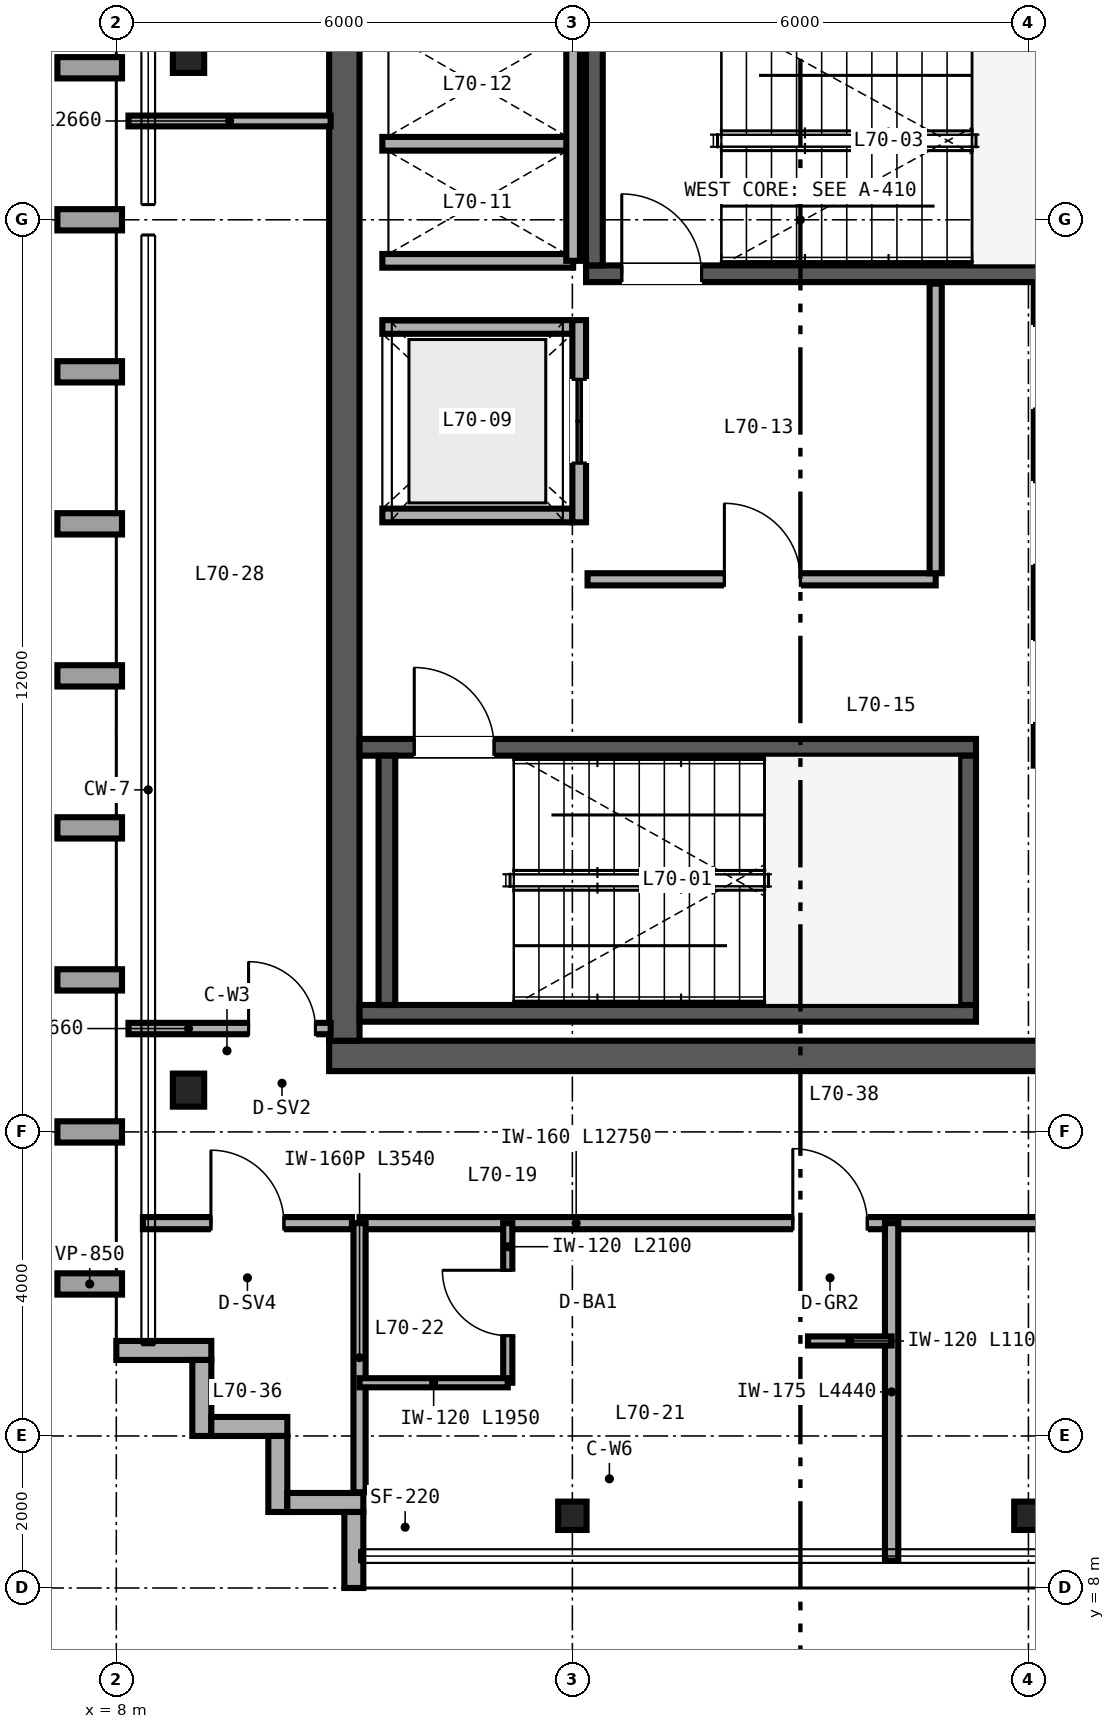
"""IFC4 building model, lengths in metres.
Left out: names, types, materials, properties, quantities, classifications, styles, units other than length and angle.
Written with IfcOpenShell. Run it as: python <this file> out.ifc"""

import sys

from ifc_helpers import new_model, si_unit, direction, frame, frame_2d, origin, origin_2d, place, context, subcontext, project, spatial, rectangle, i_section, extrude, source, transform, mapped, element, fill, save


model = new_model("IFC4")
c1 = context("Model", 3, precision=1e-05, world=origin(), true_north=direction((0.0, 1.0)))
c2 = subcontext(c1, "Body", "Model", "MODEL_VIEW")
j1 = project(units=[si_unit("LENGTHUNIT", "METRE"), si_unit("PLANEANGLEUNIT", "RADIAN")], contexts=[c1])
p1 = place(None, origin())
s1 = spatial("IfcSite", under=j1, at=p1, CompositionType="ELEMENT")
p2 = place(p1, origin())
s2 = spatial("IfcBuilding", under=s1, at=p2, CompositionType="ELEMENT")
p3 = place(p2, frame((0.0, 0.0, 276.0)))
s3 = spatial("IfcBuildingStorey", under=s2, at=p3, CompositionType="ELEMENT", Elevation=276.0)
p4 = place(p3, frame((10.8, 15.0, 0.0), z_axis=(0.0, 0.0, 1.0), x_axis=(1.0, 0.0, 0.0)))
e1 = element("IfcWall", 1, at=p4, inside=s3, PredefinedType="SHEAR", context=c2, shape_type="SweptSolid", body=[
    extrude(rectangle(XDim=12.4, YDim=0.4, at=frame_2d((6.2, 0.0))), origin(), (0.0, 0.0, 1.0), 3.38),
])
p5 = place(p4, frame((10.1, 0.0, 0.0)))
e2 = element("IfcOpeningElement", 2, at=p5, cuts=e1, PredefinedType="OPENING", context=c2, shape_type="SweptSolid", body=[
    extrude(rectangle(XDim=1.0, YDim=2.15, at=frame_2d((0.5, 1.075))), frame((0.0, 0.21, 0.0), z_axis=(0.0, -1.0, 0.0), x_axis=(1.0, 0.0, 0.0)), (0.0, 0.0, 1.0), 0.42),
])
p6 = place(p3, frame((11.0, 15.2, 0.0), z_axis=(0.0, 0.0, 1.0), x_axis=(0.0, 1.0, 0.0)))
e3 = element("IfcWall", 3, at=p6, inside=s3, PredefinedType="SHEAR", context=c2, shape_type="SweptSolid", body=[
    extrude(rectangle(XDim=21.6, YDim=0.4, at=frame_2d((10.8, 0.0))), origin(), (0.0, 0.0, 1.0), 3.38),
])
p7 = place(p3, frame((11.2, 15.56, 0.0), z_axis=(0.0, 0.0, 1.0), x_axis=(1.0, 0.0, 0.0)))
e4 = element("IfcWall", 4, at=p7, inside=s3, PredefinedType="SHEAR", context=c2, shape_type="SweptSolid", body=[
    extrude(rectangle(XDim=8.11, YDim=0.22, at=frame_2d((4.055, 0.0))), origin(), (0.0, 0.0, 1.0), 3.4),
])
p8 = place(p3, frame((11.2, 19.06, 0.0), z_axis=(0.0, 0.0, 1.0), x_axis=(1.0, 0.0, 0.0)))
e5 = element("IfcWall", 5, at=p8, inside=s3, PredefinedType="SHEAR", context=c2, shape_type="SweptSolid", body=[
    extrude(rectangle(XDim=8.11, YDim=0.22, at=frame_2d((4.055, 0.0))), origin(), (0.0, 0.0, 1.0), 3.4),
])
p9 = place(p8, frame((0.72, 0.0, 0.0)))
e6 = element("IfcOpeningElement", 6, at=p9, cuts=e5, PredefinedType="OPENING", context=c2, shape_type="SweptSolid", body=[
    extrude(rectangle(XDim=1.05, YDim=2.15, at=frame_2d((0.525, 1.075))), frame((0.0, 0.12, 0.0), z_axis=(0.0, -1.0, 0.0), x_axis=(1.0, 0.0, 0.0)), (0.0, 0.0, 1.0), 0.24),
])
for number, where, z_axis, x_axis in (
    (7, (11.56, 15.67, 0.0), (0.0, 0.0, 1.0), (0.0, 1.0, 0.0)),
    (8, (19.2, 15.67, 0.0), (0.0, 0.0, 1.0), (0.0, 1.0, 0.0)),
):
    element("IfcWall", number, at=place(p3, frame(where, z_axis=z_axis, x_axis=x_axis)), inside=s3, PredefinedType="SHEAR", context=c2, shape_type="SweptSolid", body=[
        extrude(rectangle(XDim=3.28, YDim=0.22, at=frame_2d((1.64, 0.0))), origin(), (0.0, 0.0, 1.0), 3.4),
    ])
p10 = place(p3, frame((14.18, 25.29, 0.0), z_axis=(0.0, 0.0, 1.0), x_axis=(1.0, 0.0, 0.0)))
e9 = element("IfcWall", 9, at=p10, inside=s3, PredefinedType="SHEAR", context=c2, shape_type="SweptSolid", body=[
    extrude(rectangle(XDim=8.62, YDim=0.22, at=frame_2d((4.31, 0.0))), origin(), (0.0, 0.0, 1.0), 3.4),
])
p11 = place(p10, frame((0.47, 0.0, 0.0)))
e10 = element("IfcOpeningElement", 10, at=p11, cuts=e9, PredefinedType="OPENING", context=c2, shape_type="SweptSolid", body=[
    extrude(rectangle(XDim=1.05, YDim=2.15, at=frame_2d((0.525, 1.075))), frame((0.0, 0.12, 0.0), z_axis=(0.0, -1.0, 0.0), x_axis=(1.0, 0.0, 0.0)), (0.0, 0.0, 1.0), 0.24),
])
p12 = place(p3, frame((14.29, 25.4, 0.0), z_axis=(0.0, 0.0, 1.0), x_axis=(0.0, 1.0, 0.0)))
e11 = element("IfcWall", 11, at=p12, inside=s3, PredefinedType="SHEAR", context=c2, shape_type="SweptSolid", body=[
    extrude(rectangle(XDim=3.28, YDim=0.22, at=frame_2d((1.64, 0.0))), origin(), (0.0, 0.0, 1.0), 3.4),
])
m1 = source(origin(), c2, "Body", "SweptSolid", [
    extrude(i_section(OverallWidth=0.412, OverallDepth=0.435, WebThickness=0.036, FlangeThickness=0.057, FilletRadius=0.025, at=origin_2d()), origin(), (0.0, 0.0, 1.0), 3.38),
])
for number, where, z_axis, x_axis in (
    (12, (8.95, 14.55, 0.0), (0.0, 0.0, 1.0), (1.0, 0.0, 0.0)),
    (13, (8.95, 28.15, 0.0), (0.0, 0.0, 1.0), (1.0, 0.0, 0.0)),
):
    element("IfcColumn", number, at=place(p3, frame(where, z_axis=z_axis, x_axis=x_axis)), inside=s3, PredefinedType="COLUMN", context=c2, shape_type="MappedRepresentation", body=[
        mapped(m1, transform((0.0, 0.0, 0.0), scale=1.0)),
    ])
m2 = source(origin(), c2, "Body", "SweptSolid", [
    extrude(i_section(OverallWidth=0.374, OverallDepth=0.373, WebThickness=0.016, FlangeThickness=0.026, FilletRadius=0.025, at=origin_2d()), origin(), (0.0, 0.0, 1.0), 3.38),
])
for number, where, z_axis, x_axis in (
    (14, (14.0, 8.95, 0.0), (0.0, 0.0, 1.0), (1.0, 0.0, 0.0)),
    (15, (20.0, 8.95, 0.0), (0.0, 0.0, 1.0), (1.0, 0.0, 0.0)),
):
    element("IfcColumn", number, at=place(p3, frame(where, z_axis=z_axis, x_axis=x_axis)), inside=s3, PredefinedType="COLUMN", context=c2, shape_type="MappedRepresentation", body=[
        mapped(m2, transform((0.0, 0.0, 0.0), scale=1.0)),
    ])
p13 = place(p3, frame((8.0, 11.125, 0.0), z_axis=(0.0, 0.0, 1.0), x_axis=(1.0, 0.0, 0.0)))
e16 = element("IfcWall", 16, at=p13, inside=s3, PredefinedType="SOLIDWALL", context=c2, shape_type="SweptSolid", body=[
    extrude(rectangle(XDim=1.25, YDim=0.25, at=frame_2d((0.625, 0.0))), origin(), (0.0, 0.0, 1.0), 3.38),
])
for number, where, z_axis, x_axis in (
    (17, (9.125, 11.0, 0.0), (0.0, 0.0, 1.0), (0.0, -1.0, 0.0)),
    (18, (9.25, 10.125, 0.0), (0.0, 0.0, 1.0), (1.0, 0.0, 0.0)),
    (19, (10.125, 10.0, 0.0), (0.0, 0.0, 1.0), (0.0, -1.0, 0.0)),
    (20, (10.25, 9.125, 0.0), (0.0, 0.0, 1.0), (1.0, 0.0, 0.0)),
    (21, (11.125, 9.0, 0.0), (0.0, 0.0, 1.0), (0.0, -1.0, 0.0)),
):
    element("IfcWall", number, at=place(p3, frame(where, z_axis=z_axis, x_axis=x_axis)), inside=s3, PredefinedType="SOLIDWALL", context=c2, shape_type="SweptSolid", body=[
        extrude(rectangle(XDim=1.0, YDim=0.25, at=frame_2d((0.5, 0.0))), origin(), (0.0, 0.0, 1.0), 3.38),
    ])
p14 = place(p3, frame((20.16, 18.82, 0.0), z_axis=(0.0, 0.0, 1.0), x_axis=(0.0, 1.0, 0.0)))
e22 = element("IfcWall", 22, at=p14, inside=s3, PredefinedType="SOLIDWALL", context=c2, shape_type="SweptSolid", body=[
    extrude(rectangle(XDim=6.32, YDim=0.18, at=frame_2d((3.16, 0.0))), origin(), (0.0, 0.0, 1.0), 2.48),
])
p15 = place(p14, frame((0.555, 0.0, 0.0)))
e23 = element("IfcOpeningElement", 23, at=p15, cuts=e22, PredefinedType="OPENING", context=c2, shape_type="SweptSolid", body=[
    extrude(rectangle(XDim=1.1, YDim=2.2, at=frame_2d((0.55, 1.1))), frame((0.0, 0.1, 0.0), z_axis=(0.0, -1.0, 0.0), x_axis=(1.0, 0.0, 0.0)), (0.0, 0.0, 1.0), 0.2),
])
p16 = place(p14, frame((2.635, 0.0, 0.0)))
e24 = element("IfcOpeningElement", 24, at=p16, cuts=e22, PredefinedType="OPENING", context=c2, shape_type="SweptSolid", body=[
    extrude(rectangle(XDim=1.1, YDim=2.2, at=frame_2d((0.55, 1.1))), frame((0.0, 0.1, 0.0), z_axis=(0.0, -1.0, 0.0), x_axis=(1.0, 0.0, 0.0)), (0.0, 0.0, 1.0), 0.2),
])
p17 = place(p14, frame((4.69, 0.0, 0.0)))
e25 = element("IfcOpeningElement", 25, at=p17, cuts=e22, PredefinedType="OPENING", context=c2, shape_type="SweptSolid", body=[
    extrude(rectangle(XDim=1.1, YDim=2.2, at=frame_2d((0.55, 1.1))), frame((0.0, 0.1, 0.0), z_axis=(0.0, -1.0, 0.0), x_axis=(1.0, 0.0, 0.0)), (0.0, 0.0, 1.0), 0.2),
])
for number, where, z_axis, x_axis in (
    (26, (11.5, 22.11, 0.0), (0.0, 0.0, 1.0), (1.0, 0.0, 0.0)),
    (27, (11.5, 24.59, 0.0), (0.0, 0.0, 1.0), (1.0, 0.0, 0.0)),
):
    element("IfcWall", number, at=place(p3, frame(where, z_axis=z_axis, x_axis=x_axis)), inside=s3, PredefinedType="SOLIDWALL", context=c2, shape_type="SweptSolid", body=[
        extrude(rectangle(XDim=2.5, YDim=0.18, at=frame_2d((1.25, 0.0))), origin(), (0.0, 0.0, 1.0), 3.38),
    ])
p18 = place(p3, frame((14.09, 22.02, 0.0), z_axis=(0.0, 0.0, 1.0), x_axis=(0.0, 1.0, 0.0)))
e28 = element("IfcWall", 28, at=p18, inside=s3, PredefinedType="SOLIDWALL", context=c2, shape_type="SweptSolid", body=[
    extrude(rectangle(XDim=2.66, YDim=0.18, at=frame_2d((1.33, 0.0))), origin(), (0.0, 0.0, 1.0), 3.38),
])
p19 = place(p18, frame((0.78, 0.0, 0.0)))
e29 = element("IfcOpeningElement", 29, at=p19, cuts=e28, PredefinedType="OPENING", context=c2, shape_type="SweptSolid", body=[
    extrude(rectangle(XDim=1.1, YDim=2.2, at=frame_2d((0.55, 1.1))), frame((0.0, 0.1, 0.0), z_axis=(0.0, -1.0, 0.0), x_axis=(1.0, 0.0, 0.0)), (0.0, 0.0, 1.0), 0.2),
])
for number, where, z_axis, x_axis in (
    (30, (11.5, 25.46, 0.0), (0.0, 0.0, 1.0), (1.0, 0.0, 0.0)),
    (31, (11.5, 27.0, 0.0), (0.0, 0.0, 1.0), (1.0, 0.0, 0.0)),
):
    element("IfcWall", number, at=place(p3, frame(where, z_axis=z_axis, x_axis=x_axis)), inside=s3, PredefinedType="SOLIDWALL", context=c2, shape_type="SweptSolid", body=[
        extrude(rectangle(XDim=2.51, YDim=0.18, at=frame_2d((1.255, 0.0))), origin(), (0.0, 0.0, 1.0), 3.38),
    ])
p20 = place(p3, frame((14.01, 25.46, 0.0), z_axis=(0.0, 0.0, 1.0), x_axis=(0.0, 1.0, 0.0)))
e32 = element("IfcWall", 32, at=p20, inside=s3, PredefinedType="SOLIDWALL", context=c2, shape_type="SweptSolid", body=[
    extrude(rectangle(XDim=3.08, YDim=0.18, at=frame_2d((1.54, 0.0))), origin(), (0.0, 0.0, 1.0), 3.38),
])
p21 = place(p3, frame((14.2, 21.27, 0.0), z_axis=(0.0, 0.0, 1.0), x_axis=(1.0, 0.0, 0.0)))
e33 = element("IfcWall", 33, at=p21, inside=s3, PredefinedType="PARTITIONING", context=c2, shape_type="SweptSolid", body=[
    extrude(rectangle(XDim=4.58, YDim=0.16, at=frame_2d((2.29, 0.0))), origin(), (0.0, 0.0, 1.0), 3.38),
])
p22 = place(p21, frame((1.8, 0.0, 0.0)))
e34 = element("IfcOpeningElement", 34, at=p22, cuts=e33, PredefinedType="OPENING", context=c2, shape_type="SweptSolid", body=[
    extrude(rectangle(XDim=1.0, YDim=2.15, at=frame_2d((0.5, 1.075))), frame((0.0, 0.09, 0.0), z_axis=(0.0, -1.0, 0.0), x_axis=(1.0, 0.0, 0.0)), (0.0, 0.0, 1.0), 0.18),
])
p23 = place(p3, frame((18.78, 21.35, 0.0), z_axis=(0.0, 0.0, 1.0), x_axis=(0.0, 1.0, 0.0)))
e35 = element("IfcWall", 35, at=p23, inside=s3, PredefinedType="PARTITIONING", context=c2, shape_type="SweptSolid", body=[
    extrude(rectangle(XDim=3.81, YDim=0.16, at=frame_2d((1.905, 0.0))), origin(), (0.0, 0.0, 1.0), 3.38),
])
p24 = place(p3, frame((11.2, 12.8, 0.0), z_axis=(0.0, 0.0, 1.0), x_axis=(1.0, 0.0, 0.0)))
e36 = element("IfcWall", 36, at=p24, inside=s3, PredefinedType="PARTITIONING", context=c2, shape_type="SweptSolid", body=[
    extrude(rectangle(XDim=12.75, YDim=0.16, at=frame_2d((6.375, 0.0))), origin(), (0.0, 0.0, 1.0), 3.38),
])
p25 = place(p24, frame((5.7, 0.0, 0.0)))
e37 = element("IfcOpeningElement", 37, at=p25, cuts=e36, PredefinedType="OPENING", context=c2, shape_type="SweptSolid", body=[
    extrude(rectangle(XDim=0.98, YDim=2.2, at=frame_2d((0.49, 1.1))), frame((0.0, 0.09, 0.0), z_axis=(0.0, -1.0, 0.0), x_axis=(1.0, 0.0, 0.0)), (0.0, 0.0, 1.0), 0.18),
])
p26 = place(p24, frame((9.395, 0.0, 0.0)))
e38 = element("IfcOpeningElement", 38, at=p26, cuts=e36, PredefinedType="OPENING", context=c2, shape_type="SweptSolid", body=[
    extrude(rectangle(XDim=0.96, YDim=2.15, at=frame_2d((0.48, 1.075))), frame((0.0, 0.09, 0.0), z_axis=(0.0, -1.0, 0.0), x_axis=(1.0, 0.0, 0.0)), (0.0, 0.0, 1.0), 0.18),
])
p27 = place(p3, frame((11.2, 9.26, 0.0), z_axis=(0.0, 0.0, 1.0), x_axis=(0.0, 1.0, 0.0)))
e39 = element("IfcWall", 39, at=p27, inside=s3, PredefinedType="PARTITIONING", context=c2, shape_type="SweptSolid", body=[
    extrude(rectangle(XDim=3.54, YDim=0.16, at=frame_2d((1.77, 0.0))), origin(), (0.0, 0.0, 1.0), 3.38),
])
p28 = place(p3, frame((18.2, 8.36, 0.0), z_axis=(0.0, 0.0, 1.0), x_axis=(0.0, 1.0, 0.0)))
e40 = element("IfcWall", 40, at=p28, inside=s3, PredefinedType="PARTITIONING", context=c2, shape_type="SweptSolid", body=[
    extrude(rectangle(XDim=4.44, YDim=0.175, at=frame_2d((2.22, 0.0))), origin(), (0.0, 0.0, 1.0), 2.687),
])
p29 = place(p3, frame((13.15, 10.7, 0.0), z_axis=(0.0, 0.0, 1.0), x_axis=(0.0, 1.0, 0.0)))
e41 = element("IfcWall", 41, at=p29, inside=s3, PredefinedType="PARTITIONING", context=c2, shape_type="SweptSolid", body=[
    extrude(rectangle(XDim=2.1, YDim=0.12, at=frame_2d((1.05, 0.0))), origin(), (0.0, 0.0, 1.0), 3.38),
])
p30 = place(p29, frame((0.62, 0.0, 0.0)))
e42 = element("IfcOpeningElement", 42, at=p30, cuts=e41, PredefinedType="OPENING", context=c2, shape_type="SweptSolid", body=[
    extrude(rectangle(XDim=0.86, YDim=2.1, at=frame_2d((0.43, 1.05))), frame((0.0, 0.07, 0.0), z_axis=(0.0, -1.0, 0.0), x_axis=(1.0, 0.0, 0.0)), (0.0, 0.0, 1.0), 0.14),
])
p31 = place(p3, frame((11.2, 10.7, 0.0), z_axis=(0.0, 0.0, 1.0), x_axis=(1.0, 0.0, 0.0)))
e43 = element("IfcWall", 43, at=p31, inside=s3, PredefinedType="PARTITIONING", context=c2, shape_type="SweptSolid", body=[
    extrude(rectangle(XDim=1.95, YDim=0.12, at=frame_2d((0.975, 0.0))), origin(), (0.0, 0.0, 1.0), 3.38),
])
p32 = place(p3, frame((17.1, 11.25, 0.0), z_axis=(0.0, 0.0, 1.0), x_axis=(1.0, 0.0, 0.0)))
e44 = element("IfcWall", 44, at=p32, inside=s3, PredefinedType="PARTITIONING", context=c2, shape_type="SweptSolid", body=[
    extrude(rectangle(XDim=1.1, YDim=0.12, at=frame_2d((0.55, 0.0))), origin(), (0.0, 0.0, 1.0), 3.38),
])
p33 = place(p3, frame((8.16, 15.36, 0.0), z_axis=(0.0, 0.0, 1.0), x_axis=(1.0, 0.0, 0.0)))
e45 = element("IfcWall", 45, at=p33, inside=s3, PredefinedType="PARTITIONING", context=c2, shape_type="SweptSolid", body=[
    extrude(rectangle(XDim=2.66, YDim=0.15, at=frame_2d((1.33, 0.0))), origin(), (0.0, 0.0, 1.0), 2.601),
])
p34 = place(p33, frame((1.58, 0.0, 0.0)))
e46 = element("IfcOpeningElement", 46, at=p34, cuts=e45, PredefinedType="OPENING", context=c2, shape_type="SweptSolid", body=[
    extrude(rectangle(XDim=0.88, YDim=2.15, at=frame_2d((0.44, 1.075))), frame((0.0, 0.085, 0.0), z_axis=(0.0, -1.0, 0.0), x_axis=(1.0, 0.0, 0.0)), (0.0, 0.0, 1.0), 0.17),
])
p35 = place(p3, frame((8.16, 27.3, 0.0), z_axis=(0.0, 0.0, 1.0), x_axis=(1.0, 0.0, 0.0)))
e47 = element("IfcWall", 47, at=p35, inside=s3, PredefinedType="PARTITIONING", context=c2, shape_type="SweptSolid", body=[
    extrude(rectangle(XDim=2.66, YDim=0.142, at=frame_2d((1.33, 0.0))), origin(), (0.0, 0.0, 1.0), 2.601),
])
p36 = place(p3, frame((8.35, 12.8, 0.0), z_axis=(0.0, 0.0, 1.0), x_axis=(1.0, 0.0, 0.0)))
e48 = element("IfcWall", 48, at=p36, inside=s3, PredefinedType="PARTITIONING", context=c2, shape_type="SweptSolid", body=[
    extrude(rectangle(XDim=2.75, YDim=0.16, at=frame_2d((1.375, 0.0))), origin(), (0.0, 0.0, 1.0), 3.38),
])
p37 = place(p36, frame((0.895, 0.0, 0.0)))
e49 = element("IfcOpeningElement", 49, at=p37, cuts=e48, PredefinedType="OPENING", context=c2, shape_type="SweptSolid", body=[
    extrude(rectangle(XDim=0.96, YDim=2.15, at=frame_2d((0.48, 1.075))), frame((0.0, 0.09, 0.0), z_axis=(0.0, -1.0, 0.0), x_axis=(1.0, 0.0, 0.0)), (0.0, 0.0, 1.0), 0.18),
])
m3 = source(origin(), c2, "Body", "SweptSolid", [
    extrude(rectangle(XDim=1.05, YDim=2.15, at=frame_2d((0.525, 1.075))), frame((0.0, 0.025, 0.0), z_axis=(0.0, -1.0, 0.0), x_axis=(1.0, 0.0, 0.0)), (0.0, 0.0, 1.0), 0.05),
])
p38 = place(p9, origin())
e50 = element("IfcDoor", 50, at=p38, inside=s3, OperationType="SINGLE_SWING_LEFT", PredefinedType="DOOR", context=c2, shape_type="MappedRepresentation", body=[
    mapped(m3, transform((0.0, 0.0, 0.0), scale=1.0)),
])
fill(e6, e50)
p39 = place(p11, origin())
e51 = element("IfcDoor", 51, at=p39, inside=s3, OperationType="SINGLE_SWING_LEFT", PredefinedType="DOOR", context=c2, shape_type="MappedRepresentation", body=[
    mapped(m3, transform((0.0, 0.0, 0.0), scale=1.0)),
])
fill(e10, e51)
m4 = source(origin(), c2, "Body", "SweptSolid", [
    extrude(rectangle(XDim=1.1, YDim=2.2, at=frame_2d((0.55, 1.1))), frame((0.0, 0.025, 0.0), z_axis=(0.0, -1.0, 0.0), x_axis=(1.0, 0.0, 0.0)), (0.0, 0.0, 1.0), 0.05),
])
p40 = place(p19, origin())
e52 = element("IfcDoor", 52, at=p40, inside=s3, OperationType="DOUBLE_DOOR_SLIDING", PredefinedType="DOOR", context=c2, shape_type="MappedRepresentation", body=[
    mapped(m4, transform((0.0, 0.0, 0.0), scale=1.0)),
])
fill(e29, e52)
m5 = source(origin(), c2, "Body", "SweptSolid", [
    extrude(rectangle(XDim=1.0, YDim=2.15, at=frame_2d((0.5, 1.075))), frame((0.0, 0.025, 0.0), z_axis=(0.0, -1.0, 0.0), x_axis=(1.0, 0.0, 0.0)), (0.0, 0.0, 1.0), 0.05),
])
p41 = place(p22, origin())
e53 = element("IfcDoor", 53, at=p41, inside=s3, OperationType="SINGLE_SWING_LEFT", PredefinedType="DOOR", context=c2, shape_type="MappedRepresentation", body=[
    mapped(m5, transform((0.0, 0.0, 0.0), scale=1.0)),
])
fill(e34, e53)
m6 = source(origin(), c2, "Body", "SweptSolid", [
    extrude(rectangle(XDim=0.86, YDim=2.1, at=frame_2d((0.43, 1.05))), frame((0.0, 0.025, 0.0), z_axis=(0.0, -1.0, 0.0), x_axis=(1.0, 0.0, 0.0)), (0.0, 0.0, 1.0), 0.05),
])
p42 = place(p30, origin())
e54 = element("IfcDoor", 54, at=p42, inside=s3, OperationType="SINGLE_SWING_RIGHT", PredefinedType="DOOR", context=c2, shape_type="MappedRepresentation", body=[
    mapped(m6, transform((0.0, 0.0, 0.0), scale=1.0)),
])
fill(e42, e54)
m7 = source(origin(), c2, "Body", "SweptSolid", [
    extrude(rectangle(XDim=0.98, YDim=2.2, at=frame_2d((0.49, 1.1))), frame((0.0, 0.025, 0.0), z_axis=(0.0, -1.0, 0.0), x_axis=(1.0, 0.0, 0.0)), (0.0, 0.0, 1.0), 0.05),
])
p43 = place(p25, origin())
e55 = element("IfcDoor", 55, at=p43, inside=s3, OperationType="SINGLE_SWING_LEFT", PredefinedType="DOOR", context=c2, shape_type="MappedRepresentation", body=[
    mapped(m7, transform((0.0, 0.0, 0.0), scale=1.0)),
])
fill(e37, e55)
m8 = source(origin(), c2, "Body", "SweptSolid", [
    extrude(rectangle(XDim=0.88, YDim=2.15, at=frame_2d((0.44, 1.075))), frame((0.0, 0.025, 0.0), z_axis=(0.0, -1.0, 0.0), x_axis=(1.0, 0.0, 0.0)), (0.0, 0.0, 1.0), 0.05),
])
p44 = place(p34, origin())
e56 = element("IfcDoor", 56, at=p44, inside=s3, OperationType="SINGLE_SWING_LEFT", PredefinedType="DOOR", context=c2, shape_type="MappedRepresentation", body=[
    mapped(m8, transform((0.0, 0.0, 0.0), scale=1.0)),
])
fill(e46, e56)
m9 = source(origin(), c2, "Body", "SweptSolid", [
    extrude(rectangle(XDim=0.96, YDim=2.15, at=frame_2d((0.48, 1.075))), frame((0.0, 0.025, 0.0), z_axis=(0.0, -1.0, 0.0), x_axis=(1.0, 0.0, 0.0)), (0.0, 0.0, 1.0), 0.05),
])
p45 = place(p37, origin())
e57 = element("IfcDoor", 57, at=p45, inside=s3, OperationType="SINGLE_SWING_LEFT", PredefinedType="DOOR", context=c2, shape_type="MappedRepresentation", body=[
    mapped(m9, transform((0.0, 0.0, 0.0), scale=1.0)),
])
fill(e49, e57)
save(model, sys.argv[1])
